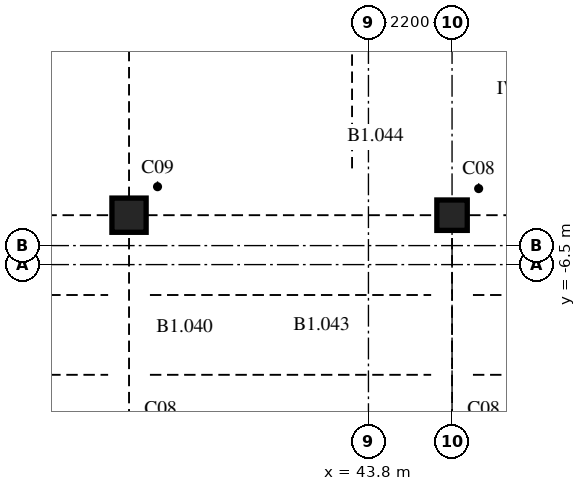
"""IFC4 building model, lengths in metres.
Left out: names, types, materials, properties, quantities, classifications, styles, units other than length and angle.
Written with IfcOpenShell. Run it as: python <this file> out.ifc"""

import sys

from ifc_helpers import new_model, si_unit, direction, frame, origin, origin_2d, place, context, subcontext, project, spatial, rectangle, extrude, element, save


model = new_model("IFC4")
c1 = context("Model", 3, precision=1e-05, world=origin(), true_north=direction((0.0, 1.0)))
c2 = subcontext(c1, "Body", "Model", "MODEL_VIEW")
j1 = project(units=[si_unit("LENGTHUNIT", "METRE"), si_unit("PLANEANGLEUNIT", "RADIAN")], contexts=[c1])
p1 = place(None, origin())
s1 = spatial("IfcSite", under=j1, at=p1, CompositionType="ELEMENT")
p2 = place(p1, origin())
s2 = spatial("IfcBuilding", under=s1, at=p2, CompositionType="ELEMENT")
p3 = place(p2, frame((0.0, 0.0, -4.0)))
s3 = spatial("IfcBuildingStorey", under=s2, at=p3, CompositionType="ELEMENT", Elevation=-4.0)
p4 = place(p3, frame((37.5, -5.2, 0.0), z_axis=(0.0, 0.0, 1.0), x_axis=(1.0, 0.0, 0.0)))
e1 = element("IfcColumn", 1, at=p4, inside=s3, PredefinedType="COLUMN", context=c2, shape_type="SweptSolid", body=[
    extrude(rectangle(XDim=0.9, YDim=0.9, at=origin_2d()), origin(), (0.0, 0.0, 1.0), 4.0),
])
p5 = place(p3, frame((46.0, -5.2, 0.0), z_axis=(0.0, 0.0, 1.0), x_axis=(1.0, 0.0, 0.0)))
e2 = element("IfcColumn", 2, at=p5, inside=s3, PredefinedType="COLUMN", context=c2, shape_type="SweptSolid", body=[
    extrude(rectangle(XDim=0.8, YDim=0.8, at=origin_2d()), origin(), (0.0, 0.0, 1.0), 4.0),
])
save(model, sys.argv[1])
